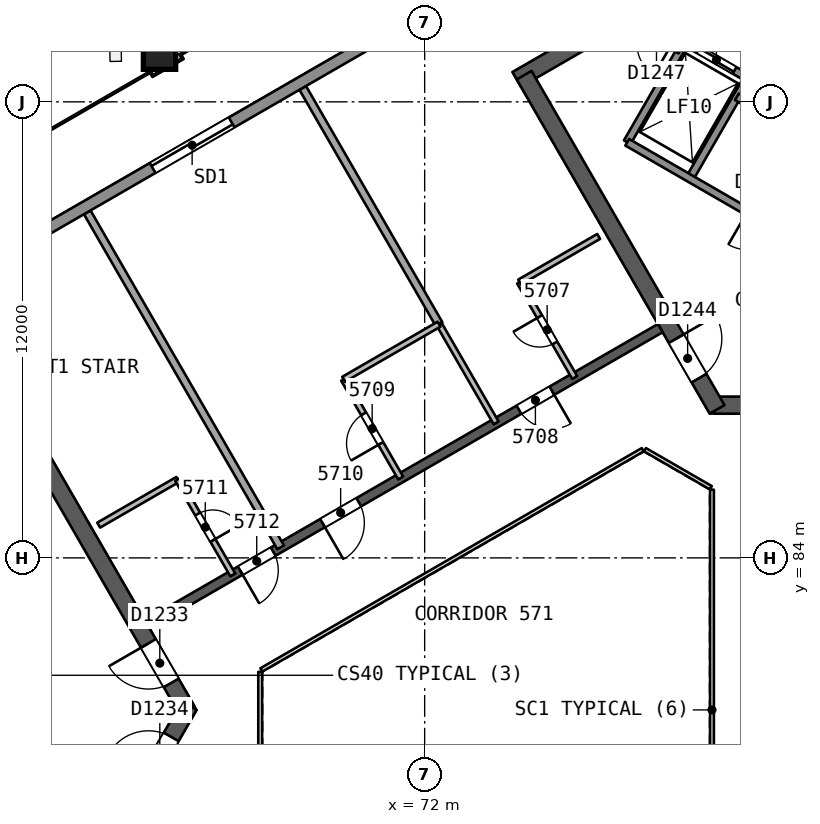
"""IFC4 building model, lengths in metres.
Left out: names, types, materials, properties, quantities, classifications, styles, units other than length and angle.
Written with IfcOpenShell. Run it as: python <this file> out.ifc"""

import sys

from ifc_helpers import new_model, si_unit, direction, frame, frame_2d, origin, origin_2d, place, context, subcontext, project, spatial, rectangle, extrude, element, fill, save


model = new_model("IFC4")
c1 = context("Model", 3, precision=1e-05, world=origin(), true_north=direction((0.0, 1.0)))
c2 = subcontext(c1, "Body", "Model", "MODEL_VIEW")
j1 = project(units=[si_unit("LENGTHUNIT", "METRE"), si_unit("PLANEANGLEUNIT", "RADIAN")], contexts=[c1])
p1 = place(None, origin())
s1 = spatial("IfcSite", under=j1, at=p1, CompositionType="ELEMENT")
p2 = place(p1, origin())
s2 = spatial("IfcBuilding", under=s1, at=p2, CompositionType="ELEMENT")
p3 = place(p2, frame((0.0, 0.0, 231.7)))
s3 = spatial("IfcBuildingStorey", under=s2, at=p3, CompositionType="ELEMENT", Elevation=231.7)
p4 = place(p3, frame((65.74, 80.0, 0.0), z_axis=(0.0, 0.0, 1.0), x_axis=(-0.499991857942, 0.866030104553, 0.0)))
e1 = element("IfcWall", 1, at=p4, inside=s3, PredefinedType="SHEAR", context=c2, shape_type="SweptSolid", body=[
    extrude(rectangle(XDim=10.25, YDim=0.45, at=frame_2d((5.125, 0.0))), origin(), (0.0, 0.0, 1.0), 3.7),
])
p5 = place(p4, frame((0.82, 0.0, 0.0)))
e2 = element("IfcOpeningElement", 2, at=p5, cuts=e1, PredefinedType="OPENING", context=c2, shape_type="SweptSolid", body=[
    extrude(rectangle(XDim=1.2, YDim=2.1, at=frame_2d((0.6, 1.05))), frame((0.0, 0.235, 0.0), z_axis=(0.0, -1.0, 0.0), x_axis=(1.0, 0.0, 0.0)), (0.0, 0.0, 1.0), 0.471),
])
p6 = place(p3, frame((60.728, 71.318, 0.0), z_axis=(0.0, 0.0, 1.0), x_axis=(0.500012416173, 0.866018235185, 0.0)))
e3 = element("IfcWall", 3, at=p6, inside=s3, PredefinedType="SHEAR", context=c2, shape_type="SweptSolid", body=[
    extrude(rectangle(XDim=10.155, YDim=0.45, at=frame_2d((5.078, 0.0))), origin(), (0.0, 0.0, 1.0), 3.7),
])
p7 = place(p6, frame((8.005, 0.0, 0.0)))
e4 = element("IfcOpeningElement", 4, at=p7, cuts=e3, PredefinedType="OPENING", context=c2, shape_type="SweptSolid", body=[
    extrude(rectangle(XDim=1.2, YDim=2.1, at=frame_2d((0.6, 1.05))), frame((0.0, 0.235, 0.0), z_axis=(0.0, -1.0, 0.0), x_axis=(1.0, 0.0, 0.0)), (0.0, 0.0, 1.0), 0.471),
])
p8 = place(p3, frame((79.63, 88.019, 0.0), z_axis=(0.0, 0.0, 1.0), x_axis=(1.0, 0.0, 0.0)))
e5 = element("IfcWall", 5, at=p8, inside=s3, PredefinedType="SHEAR", context=c2, shape_type="SweptSolid", body=[
    extrude(rectangle(XDim=10.25, YDim=0.45, at=frame_2d((5.125, 0.0))), origin(), (0.0, 0.0, 1.0), 3.7),
])
p9 = place(p8, frame((0.82, 0.0, 0.0)))
e6 = element("IfcOpeningElement", 6, at=p9, cuts=e5, PredefinedType="OPENING", context=c2, shape_type="SweptSolid", body=[
    extrude(rectangle(XDim=1.2, YDim=2.1, at=frame_2d((0.6, 1.05))), frame((0.0, 0.235, 0.0), z_axis=(0.0, -1.0, 0.0), x_axis=(1.0, 0.0, 0.0)), (0.0, 0.0, 1.0), 0.471),
])
p10 = place(p3, frame((86.723, 103.69, 0.0), z_axis=(0.0, 0.0, 1.0), x_axis=(-0.866022713978, -0.500004658852, 0.0)))
e7 = element("IfcWall", 7, at=p10, inside=s3, PredefinedType="SHEAR", context=c2, shape_type="SweptSolid", body=[
    extrude(rectangle(XDim=14.203, YDim=0.45, at=frame_2d((7.102, 0.0))), origin(), (0.0, 0.0, 1.0), 3.7),
])
p11 = place(p3, frame((74.617, 96.701, 0.0), z_axis=(0.0, 0.0, 1.0), x_axis=(0.499994385119, -0.866028645513, 0.0)))
e8 = element("IfcWall", 8, at=p11, inside=s3, PredefinedType="SHEAR", context=c2, shape_type="SweptSolid", body=[
    extrude(rectangle(XDim=10.155, YDim=0.45, at=frame_2d((5.077, 0.0))), origin(), (0.0, 0.0, 1.0), 3.7),
])
p12 = place(p11, frame((8.005, 0.0, 0.0)))
e9 = element("IfcOpeningElement", 9, at=p12, cuts=e8, PredefinedType="OPENING", context=c2, shape_type="SweptSolid", body=[
    extrude(rectangle(XDim=1.2, YDim=2.1, at=frame_2d((0.6, 1.05))), frame((0.0, 0.235, 0.0), z_axis=(0.0, -1.0, 0.0), x_axis=(1.0, 0.0, 0.0)), (0.0, 0.0, 1.0), 0.471),
])
p13 = place(p3, frame((78.2, 90.046, 0.0), z_axis=(0.0, 0.0, 1.0), x_axis=(-0.866026492143, -0.499998114903, 0.0)))
e10 = element("IfcWall", 10, at=p13, inside=s3, PredefinedType="SHEAR", context=c2, shape_type="SweptSolid", body=[
    extrude(rectangle(XDim=15.588, YDim=0.25, at=frame_2d((7.794, 0.0))), origin(), (0.0, 0.0, 1.0), 3.3),
])
p14 = place(p13, frame((3.294, 0.0, 0.0)))
e11 = element("IfcOpeningElement", 11, at=p14, cuts=e10, PredefinedType="OPENING", context=c2, shape_type="SweptSolid", body=[
    extrude(rectangle(XDim=1.0, YDim=2.1, at=frame_2d((0.5, 1.05))), frame((0.0, 0.135, 0.0), z_axis=(0.0, -1.0, 0.0), x_axis=(1.0, 0.0, 0.0)), (0.0, 0.0, 1.0), 0.271),
])
p15 = place(p13, frame((9.162, 0.0, 0.0)))
e12 = element("IfcOpeningElement", 12, at=p15, cuts=e10, PredefinedType="OPENING", context=c2, shape_type="SweptSolid", body=[
    extrude(rectangle(XDim=1.1, YDim=2.1, at=frame_2d((0.55, 1.05))), frame((0.0, 0.135, 0.0), z_axis=(0.0, -1.0, 0.0), x_axis=(1.0, 0.0, 0.0)), (0.0, 0.0, 1.0), 0.271),
])
p16 = place(p13, frame((11.762, 0.0, 0.0)))
e13 = element("IfcOpeningElement", 13, at=p16, cuts=e10, PredefinedType="OPENING", context=c2, shape_type="SweptSolid", body=[
    extrude(rectangle(XDim=1.0, YDim=2.1, at=frame_2d((0.5, 1.05))), frame((0.0, 0.135, 0.0), z_axis=(0.0, -1.0, 0.0), x_axis=(1.0, 0.0, 0.0)), (0.0, 0.0, 1.0), 0.271),
])
p17 = place(p3, frame((65.011, 97.301, 0.0), z_axis=(0.010093620709, -0.017482414954, 0.999796221231), x_axis=(0.86601685016, 0.500014815019, 2.20911e-07)))
e14 = element("IfcColumn", 14, at=p17, inside=s3, PredefinedType="COLUMN", context=c2, shape_type="SweptSolid", body=[
    extrude(rectangle(XDim=0.85, YDim=0.85, at=origin_2d()), origin(), (0.0, 0.0, 1.0), 3.701),
])
p18 = place(p3, frame((75.948, 88.746, 0.0), z_axis=(0.0, 0.0, 1.0), x_axis=(-0.499987231761, 0.866032775405, 0.0)))
e15 = element("IfcWall", 15, at=p18, inside=s3, PredefinedType="PARTITIONING", context=c2, shape_type="SweptSolid", body=[
    extrude(rectangle(XDim=2.9, YDim=0.15, at=frame_2d((1.45, 0.0))), origin(), (0.0, 0.0, 1.0), 3.3),
])
p19 = place(p18, frame((1.05, 0.0, 0.0)))
e16 = element("IfcOpeningElement", 16, at=p19, cuts=e15, PredefinedType="OPENING", context=c2, shape_type="SweptSolid", body=[
    extrude(rectangle(XDim=0.8, YDim=2.1, at=frame_2d((0.4, 1.05))), frame((0.0, 0.085, 0.0), z_axis=(0.0, -1.0, 0.0), x_axis=(1.0, 0.0, 0.0)), (0.0, 0.0, 1.0), 0.171),
])
p20 = place(p3, frame((74.498, 91.257, 0.0), z_axis=(0.0, 0.0, 1.0), x_axis=(0.866038271014, 0.499977712642, 0.0)))
e17 = element("IfcWall", 17, at=p20, inside=s3, PredefinedType="PARTITIONING", context=c2, shape_type="SweptSolid", body=[
    extrude(rectangle(XDim=2.401, YDim=0.15, at=frame_2d((1.2, 0.0))), origin(), (0.0, 0.0, 1.0), 3.3),
])
p21 = place(p3, frame((68.791, 96.367, 0.0), z_axis=(0.0, 0.0, 1.0), x_axis=(0.499994271117, -0.866028711331, 0.0)))
e18 = element("IfcWall", 18, at=p21, inside=s3, PredefinedType="PARTITIONING", context=c2, shape_type="SweptSolid", body=[
    extrude(rectangle(XDim=7.179, YDim=0.2, at=frame_2d((3.589, 0.0))), origin(), (0.0, 0.0, 1.0), 3.3),
])
p22 = place(p3, frame((72.38, 90.15, 0.0), z_axis=(0.0, 0.0, 1.0), x_axis=(0.499990139034, -0.866031096941, 0.0)))
e19 = element("IfcWall", 19, at=p22, inside=s3, PredefinedType="PARTITIONING", context=c2, shape_type="SweptSolid", body=[
    extrude(rectangle(XDim=3.0, YDim=0.15, at=frame_2d((1.5, 0.0))), origin(), (0.0, 0.0, 1.0), 3.3),
])
p23 = place(p3, frame((71.368, 86.102, 0.0), z_axis=(0.0, 0.0, 1.0), x_axis=(-0.50002537861, 0.866010750942, 0.0)))
e20 = element("IfcWall", 20, at=p23, inside=s3, PredefinedType="PARTITIONING", context=c2, shape_type="SweptSolid", body=[
    extrude(rectangle(XDim=3.0, YDim=0.15, at=frame_2d((1.5, 0.0))), origin(), (0.0, 0.0, 1.0), 3.3),
])
p24 = place(p23, frame((1.05, 0.0, 0.0)))
e21 = element("IfcOpeningElement", 21, at=p24, cuts=e20, PredefinedType="OPENING", context=c2, shape_type="SweptSolid", body=[
    extrude(rectangle(XDim=0.9, YDim=2.1, at=frame_2d((0.45, 1.05))), frame((0.0, 0.085, 0.0), z_axis=(0.0, -1.0, 0.0), x_axis=(1.0, 0.0, 0.0)), (0.0, 0.0, 1.0), 0.171),
])
p25 = place(p3, frame((69.868, 88.7, 0.0), z_axis=(0.0, 0.0, 1.0), x_axis=(0.865996321171, 0.50005036918, 0.0)))
e22 = element("IfcWall", 22, at=p25, inside=s3, PredefinedType="PARTITIONING", context=c2, shape_type="SweptSolid", body=[
    extrude(rectangle(XDim=2.9, YDim=0.15, at=frame_2d((1.45, 0.0))), origin(), (0.0, 0.0, 1.0), 3.3),
])
p26 = place(p3, frame((63.121, 93.093, 0.0), z_axis=(0.0, 0.0, 1.0), x_axis=(0.499993053251, -0.866029414455, 0.0)))
e23 = element("IfcWall", 23, at=p26, inside=s3, PredefinedType="PARTITIONING", context=c2, shape_type="SweptSolid", body=[
    extrude(rectangle(XDim=10.179, YDim=0.2, at=frame_2d((5.089, 0.0))), origin(), (0.0, 0.0, 1.0), 3.3),
])
p27 = place(p3, frame((63.422, 84.863, 0.0), z_axis=(0.0, 0.0, 1.0), x_axis=(0.865994240961, 0.500053971709, 0.0)))
e24 = element("IfcWall", 24, at=p27, inside=s3, PredefinedType="PARTITIONING", context=c2, shape_type="SweptSolid", body=[
    extrude(rectangle(XDim=2.401, YDim=0.15, at=frame_2d((1.201, 0.0))), origin(), (0.0, 0.0, 1.0), 3.3),
])
p28 = place(p3, frame((65.502, 86.063, 0.0), z_axis=(0.0, 0.0, 1.0), x_axis=(0.499987231761, -0.866032775405, 0.0)))
e25 = element("IfcWall", 25, at=p28, inside=s3, PredefinedType="PARTITIONING", context=c2, shape_type="SweptSolid", body=[
    extrude(rectangle(XDim=2.9, YDim=0.15, at=frame_2d((1.45, 0.0))), origin(), (0.0, 0.0, 1.0), 3.3),
])
p29 = place(p28, frame((1.05, 0.0, 0.0)))
e26 = element("IfcOpeningElement", 26, at=p29, cuts=e25, PredefinedType="OPENING", context=c2, shape_type="SweptSolid", body=[
    extrude(rectangle(XDim=0.8, YDim=2.1, at=frame_2d((0.4, 1.05))), frame((0.0, 0.085, 0.0), z_axis=(0.0, -1.0, 0.0), x_axis=(1.0, 0.0, 0.0)), (0.0, 0.0, 1.0), 0.171),
])
p30 = place(p3, frame((44.584, 82.563, 0.0), z_axis=(0.0, 0.0, 1.0), x_axis=(0.866023992326, 0.500002444709, 0.0)))
e27 = element("IfcWall", 27, at=p30, inside=s3, PredefinedType="SOLIDWALL", context=c2, shape_type="SweptSolid", body=[
    extrude(rectangle(XDim=50.118, YDim=0.3, at=frame_2d((25.059, 0.0))), origin(), (0.0, 0.0, 1.0), 3.3),
])
p31 = place(p30, frame((23.391, 0.0, 0.0)))
e28 = element("IfcOpeningElement", 28, at=p31, cuts=e27, PredefinedType="OPENING", context=c2, shape_type="SweptSolid", body=[
    extrude(rectangle(XDim=2.4, YDim=2.4, at=frame_2d((1.2, 1.2))), frame((0.0, 0.161, 0.0), z_axis=(0.0, -1.0, 0.0), x_axis=(1.0, 0.0, 0.0)), (0.0, 0.0, 1.0), 0.321),
])
p32 = place(p30, frame((37.835, 0.0, 0.0)))
e29 = element("IfcOpeningElement", 29, at=p32, cuts=e27, PredefinedType="OPENING", context=c2, shape_type="SweptSolid", body=[
    extrude(rectangle(XDim=2.4, YDim=2.4, at=frame_2d((1.2, 1.2))), frame((0.0, 0.161, 0.0), z_axis=(0.0, -1.0, 0.0), x_axis=(1.0, 0.0, 0.0)), (0.0, 0.0, 1.0), 0.321),
])
p33 = place(p30, frame((9.416, 0.0, 0.0)))
e30 = element("IfcOpeningElement", 30, at=p33, cuts=e27, PredefinedType="OPENING", context=c2, shape_type="SweptSolid", body=[
    extrude(rectangle(XDim=2.4, YDim=2.4, at=frame_2d((1.2, 1.2))), frame((0.0, 0.161, 0.0), z_axis=(0.0, -1.0, 0.0), x_axis=(1.0, 0.0, 0.0)), (0.0, 0.0, 1.0), 0.321),
])
for number, where, z_axis, x_axis in (
    (31, (78.976, 93.986, 0.0), (0.0, 0.0, 1.0), (0.5, 0.866, 0.0)),
    (32, (77.33, 94.936, 0.0), (0.0, 0.0, 1.0), (0.5, 0.866, 0.0)),
):
    element("IfcWall", number, at=place(p3, frame(where, z_axis=z_axis, x_axis=x_axis)), inside=s3, PredefinedType="SOLIDWALL", context=c2, shape_type="SweptSolid", body=[
        extrude(rectangle(XDim=3.05, YDim=0.2, at=frame_2d((1.525, 0.0))), origin(), (0.0, 0.0, 1.0), 3.3),
    ])
p34 = place(p3, frame((86.77, 89.486, 0.0), z_axis=(0.0, 0.0, 1.0), x_axis=(-0.86601811187, 0.500012629753, 0.0)))
e33 = element("IfcWall", 33, at=p34, inside=s3, PredefinedType="SOLIDWALL", context=c2, shape_type="SweptSolid", body=[
    extrude(rectangle(XDim=10.9, YDim=0.2, at=frame_2d((5.45, 0.0))), origin(), (0.0, 0.0, 1.0), 3.3),
])
p35 = place(p34, frame((1.75, 0.0, 0.0)))
e34 = element("IfcOpeningElement", 34, at=p35, cuts=e33, PredefinedType="OPENING", context=c2, shape_type="SweptSolid", body=[
    extrude(rectangle(XDim=1.0, YDim=2.1, at=frame_2d((0.5, 1.05))), frame((0.0, 0.11, 0.0), z_axis=(0.0, -1.0, 0.0), x_axis=(1.0, 0.0, 0.0)), (0.0, 0.0, 1.0), 0.221),
])
p36 = place(p34, frame((6.25, 0.0, 0.0)))
e35 = element("IfcOpeningElement", 35, at=p36, cuts=e33, PredefinedType="OPENING", context=c2, shape_type="SweptSolid", body=[
    extrude(rectangle(XDim=1.0, YDim=2.1, at=frame_2d((0.5, 1.05))), frame((0.0, 0.11, 0.0), z_axis=(0.0, -1.0, 0.0), x_axis=(1.0, 0.0, 0.0)), (0.0, 0.0, 1.0), 0.221),
])
p37 = place(p3, frame((89.43, 90.814, 0.0), z_axis=(0.0, 0.0, 1.0), x_axis=(-0.866018983788, 0.500011119594, 0.0)))
e36 = element("IfcWall", 36, at=p37, inside=s3, PredefinedType="SOLIDWALL", context=c2, shape_type="SweptSolid", body=[
    extrude(rectangle(XDim=10.64, YDim=0.2, at=frame_2d((5.32, 0.0))), origin(), (0.0, 0.0, 1.0), 3.3),
])
p38 = place(p37, frame((0.37, 0.0, 0.0)))
e37 = element("IfcOpeningElement", 37, at=p38, cuts=e36, PredefinedType="OPENING", context=c2, shape_type="SweptSolid", body=[
    extrude(rectangle(XDim=0.9, YDim=2.1, at=frame_2d((0.45, 1.05))), frame((0.0, 0.11, 0.0), z_axis=(0.0, -1.0, 0.0), x_axis=(1.0, 0.0, 0.0)), (0.0, 0.0, 1.0), 0.221),
])
p39 = place(p3, frame((78.73, 97.361, 0.0), z_axis=(0.0, 0.0, 1.0), x_axis=(-0.866045896294, 0.499964504253, 0.0)))
e38 = element("IfcWall", 38, at=p39, inside=s3, PredefinedType="PARTITIONING", context=c2, shape_type="SweptSolid", body=[
    extrude(rectangle(XDim=1.455, YDim=0.2, at=frame_2d((0.728, 0.0))), origin(), (0.0, 0.0, 1.0), 3.3),
])
p40 = place(p39, frame((0.278, 0.0, 0.0)))
e39 = element("IfcOpeningElement", 39, at=p40, cuts=e38, PredefinedType="OPENING", context=c2, shape_type="SweptSolid", body=[
    extrude(rectangle(XDim=0.9, YDim=2.1, at=frame_2d((0.45, 1.05))), frame((0.0, 0.11, 0.0), z_axis=(0.0, -1.0, 0.0), x_axis=(1.0, 0.0, 0.0)), (0.0, 0.0, 1.0), 0.221),
])
p41 = place(p3, frame((80.5, 96.627, 0.0), z_axis=(0.0, 0.0, 1.0), x_axis=(-0.86601224135, 0.500022797313, 0.0)))
e40 = element("IfcWall", 40, at=p41, inside=s3, PredefinedType="SOLIDWALL", context=c2, shape_type="SweptSolid", body=[
    extrude(rectangle(XDim=1.9, YDim=0.2, at=frame_2d((0.95, 0.0))), origin(), (0.0, 0.0, 1.0), 3.3),
])
p42 = place(p41, frame((0.4, 0.0, 0.0)))
e41 = element("IfcOpeningElement", 41, at=p42, cuts=e40, PredefinedType="OPENING", context=c2, shape_type="SweptSolid", body=[
    extrude(rectangle(XDim=1.1, YDim=2.1, at=frame_2d((0.55, 1.05))), frame((0.0, 0.11, 0.0), z_axis=(0.0, -1.0, 0.0), x_axis=(1.0, 0.0, 0.0)), (0.0, 0.0, 1.0), 0.221),
])
p43 = place(p3, frame((79.56, 74.206, 0.0), z_axis=(0.0, 0.0, 1.0), x_axis=(0.0, 1.0, 0.0)))
e42 = element("IfcWall", 42, at=p43, inside=s3, PredefinedType="PARTITIONING", context=c2, shape_type="SweptSolid", body=[
    extrude(rectangle(XDim=11.588, YDim=0.1, at=frame_2d((5.794, 0.0))), origin(), (0.0, 0.0, 1.0), 3.3),
])
p44 = place(p3, frame((79.53, 85.846, 0.0), z_axis=(0.0, 0.0, 1.0), x_axis=(-0.866041268327, 0.499972520799, 0.0)))
e43 = element("IfcWall", 43, at=p44, inside=s3, PredefinedType="PARTITIONING", context=c2, shape_type="SweptSolid", body=[
    extrude(rectangle(XDim=2.0, YDim=0.1, at=frame_2d((1.0, 0.0))), origin(), (0.0, 0.0, 1.0), 3.3),
])
p45 = place(p3, frame((77.738, 86.846, 0.0), z_axis=(0.0, 0.0, 1.0), x_axis=(-0.866026658274, -0.499997827154, 0.0)))
e44 = element("IfcWall", 44, at=p45, inside=s3, PredefinedType="PARTITIONING", context=c2, shape_type="SweptSolid", body=[
    extrude(rectangle(XDim=11.588, YDim=0.1, at=frame_2d((5.794, 0.0))), origin(), (0.0, 0.0, 1.0), 3.3),
])
p46 = place(p3, frame((67.672, 81.0, 0.0), z_axis=(0.0, 0.0, 1.0), x_axis=(0.0, -1.0, 0.0)))
e45 = element("IfcWall", 45, at=p46, inside=s3, PredefinedType="PARTITIONING", context=c2, shape_type="SweptSolid", body=[
    extrude(rectangle(XDim=2.0, YDim=0.1, at=frame_2d((1.0, 0.0))), origin(), (0.0, 0.0, 1.0), 3.3),
])
p47 = place(p19, origin())
e46 = element("IfcDoor", 46, at=p47, inside=s3, OperationType="SINGLE_SWING_RIGHT", PredefinedType="NOTDEFINED", context=c2, shape_type="SweptSolid", body=[
    extrude(rectangle(XDim=0.8, YDim=2.1, at=frame_2d((0.4, 1.05))), frame((0.0, 0.025, 0.0), z_axis=(0.0, -1.0, 0.0), x_axis=(1.0, 0.0, 0.0)), (0.0, 0.0, 1.0), 0.05),
])
fill(e16, e46)
p48 = place(p14, origin())
e47 = element("IfcDoor", 47, at=p48, inside=s3, OperationType="SINGLE_SWING_LEFT", PredefinedType="NOTDEFINED", context=c2, shape_type="SweptSolid", body=[
    extrude(rectangle(XDim=1.0, YDim=2.1, at=frame_2d((0.5, 1.05))), frame((0.0, 0.025, 0.0), z_axis=(0.0, -1.0, 0.0), x_axis=(1.0, 0.0, 0.0)), (0.0, 0.0, 1.0), 0.05),
])
fill(e11, e47)
p49 = place(p24, origin())
e48 = element("IfcDoor", 48, at=p49, inside=s3, OperationType="SINGLE_SWING_LEFT", PredefinedType="NOTDEFINED", context=c2, shape_type="SweptSolid", body=[
    extrude(rectangle(XDim=0.9, YDim=2.1, at=frame_2d((0.45, 1.05))), frame((0.0, 0.025, 0.0), z_axis=(0.0, -1.0, 0.0), x_axis=(1.0, 0.0, 0.0)), (0.0, 0.0, 1.0), 0.05),
])
fill(e21, e48)
p50 = place(p15, origin())
e49 = element("IfcDoor", 49, at=p50, inside=s3, OperationType="SINGLE_SWING_RIGHT", PredefinedType="NOTDEFINED", context=c2, shape_type="SweptSolid", body=[
    extrude(rectangle(XDim=1.1, YDim=2.1, at=frame_2d((0.55, 1.05))), frame((0.0, 0.025, 0.0), z_axis=(0.0, -1.0, 0.0), x_axis=(1.0, 0.0, 0.0)), (0.0, 0.0, 1.0), 0.05),
])
fill(e12, e49)
p51 = place(p29, origin())
e50 = element("IfcDoor", 50, at=p51, inside=s3, OperationType="SINGLE_SWING_RIGHT", PredefinedType="NOTDEFINED", context=c2, shape_type="SweptSolid", body=[
    extrude(rectangle(XDim=0.8, YDim=2.1, at=frame_2d((0.4, 1.05))), frame((0.0, 0.025, 0.0), z_axis=(0.0, -1.0, 0.0), x_axis=(1.0, 0.0, 0.0)), (0.0, 0.0, 1.0), 0.05),
])
fill(e26, e50)
p52 = place(p16, origin())
e51 = element("IfcDoor", 51, at=p52, inside=s3, OperationType="SINGLE_SWING_RIGHT", PredefinedType="NOTDEFINED", context=c2, shape_type="SweptSolid", body=[
    extrude(rectangle(XDim=1.0, YDim=2.1, at=frame_2d((0.5, 1.05))), frame((0.0, 0.025, 0.0), z_axis=(0.0, -1.0, 0.0), x_axis=(1.0, 0.0, 0.0)), (0.0, 0.0, 1.0), 0.05),
])
fill(e13, e51)
p53 = place(p31, origin())
e52 = element("IfcDoor", 52, at=p53, inside=s3, OperationType="SLIDING_TO_LEFT", PredefinedType="NOTDEFINED", context=c2, shape_type="SweptSolid", body=[
    extrude(rectangle(XDim=2.4, YDim=2.4, at=frame_2d((1.2, 1.2))), frame((0.0, 0.025, 0.0), z_axis=(0.0, -1.0, 0.0), x_axis=(1.0, 0.0, 0.0)), (0.0, 0.0, 1.0), 0.05),
])
fill(e28, e52)
p54 = place(p5, origin())
e53 = element("IfcDoor", 53, at=p54, inside=s3, OperationType="SINGLE_SWING_RIGHT", PredefinedType="NOTDEFINED", context=c2, shape_type="SweptSolid", body=[
    extrude(rectangle(XDim=1.2, YDim=2.1, at=frame_2d((0.6, 1.05))), frame((0.0, 0.025, 0.0), z_axis=(0.0, -1.0, 0.0), x_axis=(1.0, 0.0, 0.0)), (0.0, 0.0, 1.0), 0.05),
])
fill(e2, e53)
p55 = place(p7, origin())
e54 = element("IfcDoor", 54, at=p55, inside=s3, OperationType="SINGLE_SWING_LEFT", PredefinedType="NOTDEFINED", context=c2, shape_type="SweptSolid", body=[
    extrude(rectangle(XDim=1.2, YDim=2.1, at=frame_2d((0.6, 1.05))), frame((0.0, 0.025, 0.0), z_axis=(0.0, -1.0, 0.0), x_axis=(1.0, 0.0, 0.0)), (0.0, 0.0, 1.0), 0.05),
])
fill(e4, e54)
p56 = place(p12, origin())
e55 = element("IfcDoor", 55, at=p56, inside=s3, OperationType="SINGLE_SWING_LEFT", PredefinedType="NOTDEFINED", context=c2, shape_type="SweptSolid", body=[
    extrude(rectangle(XDim=1.2, YDim=2.1, at=frame_2d((0.6, 1.05))), frame((0.0, 0.025, 0.0), z_axis=(0.0, -1.0, 0.0), x_axis=(1.0, 0.0, 0.0)), (0.0, 0.0, 1.0), 0.05),
])
fill(e9, e55)
p57 = place(p42, origin())
e56 = element("IfcDoor", 56, at=p57, inside=s3, OperationType="SLIDING_TO_RIGHT", PredefinedType="NOTDEFINED", context=c2, shape_type="SweptSolid", body=[
    extrude(rectangle(XDim=1.1, YDim=2.1, at=frame_2d((0.55, 1.05))), frame((0.0, 0.025, 0.0), z_axis=(0.0, -1.0, 0.0), x_axis=(1.0, 0.0, 0.0)), (0.0, 0.0, 1.0), 0.05),
])
fill(e41, e56)
save(model, sys.argv[1])
